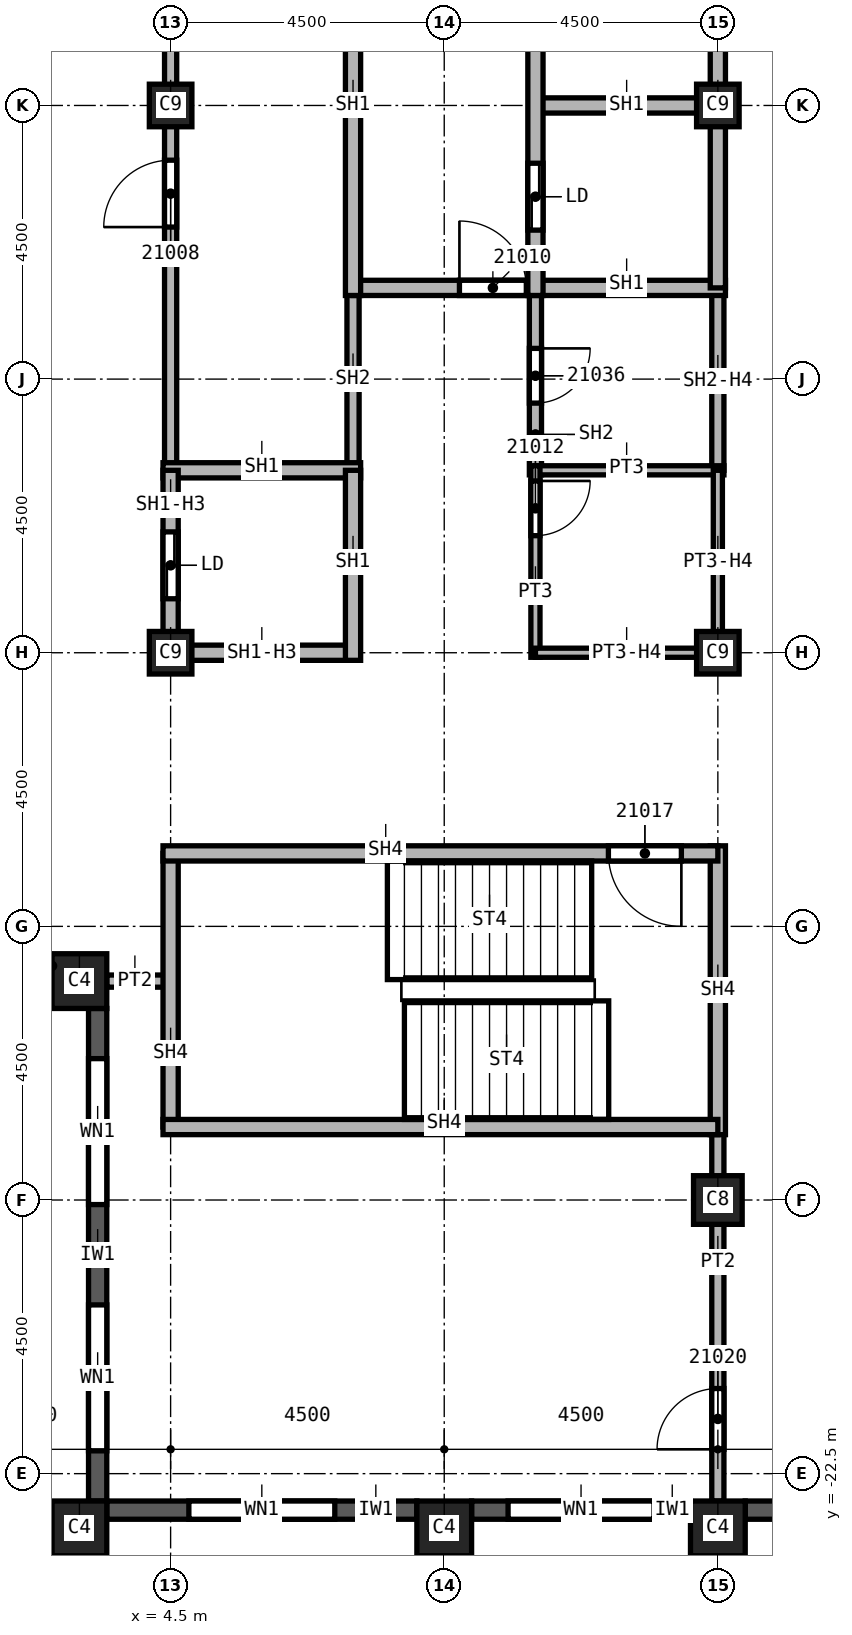
"""IFC4 building model, lengths in metres.
Left out: names, types, materials, properties, quantities, classifications, styles, units other than length and angle.
Written with IfcOpenShell. Run it as: python <this file> out.ifc"""

import sys

from ifc_helpers import new_model, si_unit, direction, frame, frame_2d, origin, origin_2d, place, context, subcontext, project, spatial, rectangle, extrude, element, fill, save


model = new_model("IFC4")
c1 = context("Model", 3, precision=1e-05, world=origin(), true_north=direction((0.0, 1.0)))
c2 = subcontext(c1, "Body", "Model", "MODEL_VIEW")
j1 = project(units=[si_unit("LENGTHUNIT", "METRE"), si_unit("PLANEANGLEUNIT", "RADIAN")], contexts=[c1])
p1 = place(None, origin())
s1 = spatial("IfcSite", under=j1, at=p1, CompositionType="ELEMENT")
p2 = place(p1, origin())
s2 = spatial("IfcBuilding", under=s1, at=p2, CompositionType="ELEMENT")
p3 = place(p2, frame((0.0, 0.0, 304.0)))
s3 = spatial("IfcBuildingStorey", under=s2, at=p3, CompositionType="ELEMENT", Elevation=304.0)
p4 = place(p3, frame((13.5, -18.0, 0.0), z_axis=(0.0, 0.0, 1.0), x_axis=(1.0, 0.0, 0.0)))
e1 = element("IfcColumn", 1, at=p4, inside=s3, PredefinedType="COLUMN", context=c2, shape_type="SweptSolid", body=[
    extrude(rectangle(XDim=0.8, YDim=0.8, at=origin_2d()), origin(), (0.0, 0.0, 1.0), 3.74),
])
for number, where, z_axis, x_axis in (
    (2, (4.5, 0.0, 0.0), (0.0, 0.0, 1.0), (1.0, 0.0, 0.0)),
    (3, (4.5, -9.0, 0.0), (0.0, 0.0, 1.0), (1.0, 0.0, 0.0)),
    (4, (13.5, 0.0, 0.0), (0.0, 0.0, 1.0), (1.0, 0.0, 0.0)),
    (5, (13.5, -9.0, 0.0), (0.0, 0.0, 1.0), (1.0, 0.0, 0.0)),
):
    element("IfcColumn", number, at=place(p3, frame(where, z_axis=z_axis, x_axis=x_axis)), inside=s3, PredefinedType="COLUMN", context=c2, shape_type="SweptSolid", body=[
        extrude(rectangle(XDim=0.7, YDim=0.7, at=origin_2d()), origin(), (0.0, 0.0, 1.0), 3.74),
    ])
for number, where, z_axis, x_axis in (
    (6, (3.0, -23.4, 0.0), (0.0, 0.0, 1.0), (1.0, 0.0, 0.0)),
    (7, (9.0, -23.4, 0.0), (0.0, 0.0, 1.0), (1.0, 0.0, 0.0)),
    (8, (13.5, -23.4, 0.0), (0.0, 0.0, 1.0), (1.0, 0.0, 0.0)),
    (9, (3.0, -14.4, 0.0), (0.0, 0.0, 1.0), (1.0, 0.0, 0.0)),
):
    element("IfcColumn", number, at=place(p3, frame(where, z_axis=z_axis, x_axis=x_axis)), inside=s3, PredefinedType="COLUMN", context=c2, shape_type="SweptSolid", body=[
        extrude(rectangle(XDim=0.9, YDim=0.9, at=origin_2d()), origin(), (0.0, 0.0, 1.0), 3.74),
    ])
p5 = place(p3, frame((3.3, -14.85, 0.0), z_axis=(0.0, 0.0, 1.0), x_axis=(0.0, -1.0, 0.0)))
e10 = element("IfcWall", 10, at=p5, inside=s3, PredefinedType="SOLIDWALL", context=c2, shape_type="SweptSolid", body=[
    extrude(rectangle(XDim=8.1, YDim=0.3, at=frame_2d((4.05, 0.0))), origin(), (0.0, 0.0, 1.0), 3.14),
])
p6 = place(p5, frame((0.825, 0.0, 0.8)))
e11 = element("IfcOpeningElement", 11, at=p6, cuts=e10, PredefinedType="OPENING", context=c2, shape_type="SweptSolid", body=[
    extrude(rectangle(XDim=2.4, YDim=1.95, at=frame_2d((1.2, 0.975))), frame((0.0, 0.15, 0.0), z_axis=(0.0, -1.0, 0.0), x_axis=(1.0, 0.0, 0.0)), (0.0, 0.0, 1.0), 0.3),
])
p7 = place(p5, frame((4.875, 0.0, 0.8)))
e12 = element("IfcOpeningElement", 12, at=p7, cuts=e10, PredefinedType="OPENING", context=c2, shape_type="SweptSolid", body=[
    extrude(rectangle(XDim=2.4, YDim=1.95, at=frame_2d((1.2, 0.975))), frame((0.0, 0.15, 0.0), z_axis=(0.0, -1.0, 0.0), x_axis=(1.0, 0.0, 0.0)), (0.0, 0.0, 1.0), 0.3),
])
p8 = place(p3, frame((3.45, -23.1, 0.0), z_axis=(0.0, 0.0, 1.0), x_axis=(1.0, 0.0, 0.0)))
e13 = element("IfcWall", 13, at=p8, inside=s3, PredefinedType="SOLIDWALL", context=c2, shape_type="SweptSolid", body=[
    extrude(rectangle(XDim=5.1, YDim=0.3, at=frame_2d((2.55, 0.0))), origin(), (0.0, 0.0, 1.0), 3.14),
])
p9 = place(p8, frame((1.35, 0.0, 0.8)))
e14 = element("IfcOpeningElement", 14, at=p9, cuts=e13, PredefinedType="OPENING", context=c2, shape_type="SweptSolid", body=[
    extrude(rectangle(XDim=2.4, YDim=1.95, at=frame_2d((1.2, 0.975))), frame((0.0, 0.15, 0.0), z_axis=(0.0, -1.0, 0.0), x_axis=(1.0, 0.0, 0.0)), (0.0, 0.0, 1.0), 0.3),
])
p10 = place(p3, frame((9.45, -23.1, 0.0), z_axis=(0.0, 0.0, 1.0), x_axis=(1.0, 0.0, 0.0)))
e15 = element("IfcWall", 15, at=p10, inside=s3, PredefinedType="SOLIDWALL", context=c2, shape_type="SweptSolid", body=[
    extrude(rectangle(XDim=3.6, YDim=0.3, at=frame_2d((1.8, 0.0))), origin(), (0.0, 0.0, 1.0), 3.14),
])
p11 = place(p10, frame((0.6, 0.0, 0.8)))
e16 = element("IfcOpeningElement", 16, at=p11, cuts=e15, PredefinedType="OPENING", context=c2, shape_type="SweptSolid", body=[
    extrude(rectangle(XDim=2.4, YDim=1.95, at=frame_2d((1.2, 0.975))), frame((0.0, 0.15, 0.0), z_axis=(0.0, -1.0, 0.0), x_axis=(1.0, 0.0, 0.0)), (0.0, 0.0, 1.0), 0.3),
])
p12 = place(p3, frame((13.95, -23.1, 0.0), z_axis=(0.0, 0.0, 1.0), x_axis=(1.0, 0.0, 0.0)))
e17 = element("IfcWall", 17, at=p12, inside=s3, PredefinedType="SOLIDWALL", context=c2, shape_type="SweptSolid", body=[
    extrude(rectangle(XDim=3.6, YDim=0.3, at=frame_2d((1.8, 0.0))), origin(), (0.0, 0.0, 1.0), 3.14),
])
p13 = place(p12, frame((0.625, 0.0, 0.8)))
e18 = element("IfcOpeningElement", 18, at=p13, cuts=e17, PredefinedType="OPENING", context=c2, shape_type="SweptSolid", body=[
    extrude(rectangle(XDim=0.6, YDim=1.95, at=frame_2d((0.3, 0.975))), frame((0.0, 0.15, 0.0), z_axis=(0.0, -1.0, 0.0), x_axis=(1.0, 0.0, 0.0)), (0.0, 0.0, 1.0), 0.3),
])
p14 = place(p12, frame((1.825, 0.0, 0.8)))
e19 = element("IfcOpeningElement", 19, at=p14, cuts=e17, PredefinedType="OPENING", context=c2, shape_type="SweptSolid", body=[
    extrude(rectangle(XDim=1.0, YDim=1.95, at=frame_2d((0.5, 0.975))), frame((0.0, 0.15, 0.0), z_axis=(0.0, -1.0, 0.0), x_axis=(1.0, 0.0, 0.0)), (0.0, 0.0, 1.0), 0.3),
])
p15 = place(p3, frame((4.5, -14.4, 0.0), z_axis=(0.0, 0.0, 1.0), x_axis=(-1.0, 0.0, 0.0)))
e20 = element("IfcWall", 20, at=p15, inside=s3, PredefinedType="PARTITIONING", context=c2, shape_type="SweptSolid", body=[
    extrude(rectangle(XDim=1.05, YDim=0.2, at=frame_2d((0.525, 0.0))), origin(), (0.0, 0.0, 1.0), 3.74),
])
p16 = place(p3, frame((13.5, -22.95, 0.0), z_axis=(0.0, 0.0, 1.0), x_axis=(0.0, 1.0, 0.0)))
e21 = element("IfcWall", 21, at=p16, inside=s3, PredefinedType="PARTITIONING", context=c2, shape_type="SweptSolid", body=[
    extrude(rectangle(XDim=6.275, YDim=0.2, at=frame_2d((3.137, 0.0))), origin(), (0.0, 0.0, 1.0), 3.74),
])
p17 = place(p16, frame((0.85, 0.0, 0.0)))
e22 = element("IfcOpeningElement", 22, at=p17, cuts=e21, PredefinedType="OPENING", context=c2, shape_type="SweptSolid", body=[
    extrude(rectangle(XDim=1.0, YDim=2.1, at=frame_2d((0.5, 1.05))), frame((0.0, 0.1, 0.0), z_axis=(0.0, -1.0, 0.0), x_axis=(1.0, 0.0, 0.0)), (0.0, 0.0, 1.0), 0.2),
])
p18 = place(p3, frame((4.5, -6.0, 0.0), z_axis=(0.0, 0.0, 1.0), x_axis=(0.0, 1.0, 0.0)))
e23 = element("IfcWall", 23, at=p18, inside=s3, PredefinedType="SOLIDWALL", context=c2, shape_type="SweptSolid", body=[
    extrude(rectangle(XDim=15.1, YDim=0.2, at=frame_2d((7.55, 0.0))), origin(), (0.0, 0.0, 1.0), 3.062),
])
p19 = place(p18, frame((4.0, 0.0, 0.0)))
e24 = element("IfcOpeningElement", 24, at=p19, cuts=e23, PredefinedType="OPENING", context=c2, shape_type="SweptSolid", body=[
    extrude(rectangle(XDim=1.1, YDim=2.1, at=frame_2d((0.55, 1.05))), frame((0.0, 0.1, 0.0), z_axis=(0.0, -1.0, 0.0), x_axis=(1.0, 0.0, 0.0)), (0.0, 0.0, 1.0), 0.2),
])
p20 = place(p18, frame((12.25, 0.0, 0.0)))
e25 = element("IfcOpeningElement", 25, at=p20, cuts=e23, PredefinedType="OPENING", context=c2, shape_type="SweptSolid", body=[
    extrude(rectangle(XDim=1.1, YDim=2.1, at=frame_2d((0.55, 1.05))), frame((0.0, 0.1, 0.0), z_axis=(0.0, -1.0, 0.0), x_axis=(1.0, 0.0, 0.0)), (0.0, 0.0, 1.0), 0.2),
])
p21 = place(p3, frame((7.5, -2.875, 0.0), z_axis=(0.0, 0.0, 1.0), x_axis=(0.0, -1.0, 0.0)))
e26 = element("IfcWall", 26, at=p21, inside=s3, PredefinedType="SOLIDWALL", context=c2, shape_type="SweptSolid", body=[
    extrude(rectangle(XDim=3.125, YDim=0.2, at=frame_2d((1.562, 0.0))), origin(), (0.0, 0.0, 1.0), 3.74),
])
p22 = place(p3, frame((10.5, -2.875, 0.0), z_axis=(0.0, 0.0, 1.0), x_axis=(0.0, -1.0, 0.0)))
e27 = element("IfcWall", 27, at=p22, inside=s3, PredefinedType="SOLIDWALL", context=c2, shape_type="SweptSolid", body=[
    extrude(rectangle(XDim=3.2, YDim=0.2, at=frame_2d((1.6, 0.0))), origin(), (0.0, 0.0, 1.0), 3.74),
])
p23 = place(p22, frame((1.12, 0.0, 0.0)))
e28 = element("IfcOpeningElement", 28, at=p23, cuts=e27, PredefinedType="OPENING", context=c2, shape_type="SweptSolid", body=[
    extrude(rectangle(XDim=0.9, YDim=2.1, at=frame_2d((0.45, 1.05))), frame((0.0, 0.1, 0.0), z_axis=(0.0, -1.0, 0.0), x_axis=(1.0, 0.0, 0.0)), (0.0, 0.0, 1.0), 0.2),
])
p24 = place(p3, frame((13.5, -3.0, 0.0), z_axis=(0.0, 0.0, 1.0), x_axis=(0.0, -1.0, 0.0)))
e29 = element("IfcWall", 29, at=p24, inside=s3, PredefinedType="SOLIDWALL", context=c2, shape_type="SweptSolid", body=[
    extrude(rectangle(XDim=3.0, YDim=0.2, at=frame_2d((1.5, 0.0))), origin(), (0.0, 0.0, 1.0), 3.062),
])
p25 = place(p3, frame((4.375, -6.0, 0.0), z_axis=(0.0, 0.0, 1.0), x_axis=(1.0, 0.0, 0.0)))
e30 = element("IfcWall", 30, at=p25, inside=s3, PredefinedType="SOLIDWALL", context=c2, shape_type="SweptSolid", body=[
    extrude(rectangle(XDim=3.25, YDim=0.25, at=frame_2d((1.625, 0.0))), origin(), (0.0, 0.0, 1.0), 3.74),
])
p26 = place(p3, frame((4.5, -9.125, 0.0), z_axis=(0.0, 0.0, 1.0), x_axis=(0.0, 1.0, 0.0)))
e31 = element("IfcWall", 31, at=p26, inside=s3, PredefinedType="SOLIDWALL", context=c2, shape_type="SweptSolid", body=[
    extrude(rectangle(XDim=3.125, YDim=0.25, at=frame_2d((1.562, 0.0))), origin(), (0.0, 0.0, 1.0), 3.062),
])
p27 = place(p26, frame((1.012, 0.0, 0.0)))
e32 = element("IfcOpeningElement", 32, at=p27, cuts=e31, PredefinedType="OPENING", context=c2, shape_type="SweptSolid", body=[
    extrude(rectangle(XDim=1.1, YDim=2.1, at=frame_2d((0.55, 1.05))), frame((0.0, 0.125, 0.0), z_axis=(0.0, -1.0, 0.0), x_axis=(1.0, 0.0, 0.0)), (0.0, 0.0, 1.0), 0.25),
])
p28 = place(p3, frame((7.5, -9.0, 0.0), z_axis=(0.0, 0.0, 1.0), x_axis=(-1.0, 0.0, 0.0)))
e33 = element("IfcWall", 33, at=p28, inside=s3, PredefinedType="SOLIDWALL", context=c2, shape_type="SweptSolid", body=[
    extrude(rectangle(XDim=3.0, YDim=0.25, at=frame_2d((1.5, 0.0))), origin(), (0.0, 0.0, 1.0), 3.062),
])
p29 = place(p3, frame((7.5, -6.0, 0.0), z_axis=(0.0, 0.0, 1.0), x_axis=(0.0, -1.0, 0.0)))
e34 = element("IfcWall", 34, at=p29, inside=s3, PredefinedType="SOLIDWALL", context=c2, shape_type="SweptSolid", body=[
    extrude(rectangle(XDim=3.125, YDim=0.25, at=frame_2d((1.562, 0.0))), origin(), (0.0, 0.0, 1.0), 3.74),
])
p30 = place(p3, frame((7.5, -3.0, 0.0), z_axis=(0.0, 0.0, 1.0), x_axis=(1.0, 0.0, 0.0)))
e35 = element("IfcWall", 35, at=p30, inside=s3, PredefinedType="SOLIDWALL", context=c2, shape_type="SweptSolid", body=[
    extrude(rectangle(XDim=6.125, YDim=0.25, at=frame_2d((3.062, 0.0))), origin(), (0.0, 0.0, 1.0), 3.74),
])
p31 = place(p30, frame((1.75, 0.0, 0.0)))
e36 = element("IfcOpeningElement", 36, at=p31, cuts=e35, PredefinedType="OPENING", context=c2, shape_type="SweptSolid", body=[
    extrude(rectangle(XDim=1.1, YDim=2.1, at=frame_2d((0.55, 1.05))), frame((0.0, 0.125, 0.0), z_axis=(0.0, -1.0, 0.0), x_axis=(1.0, 0.0, 0.0)), (0.0, 0.0, 1.0), 0.25),
])
p32 = place(p3, frame((7.5, 3.125, 0.0), z_axis=(0.0, 0.0, 1.0), x_axis=(0.0, -1.0, 0.0)))
e37 = element("IfcWall", 37, at=p32, inside=s3, PredefinedType="SOLIDWALL", context=c2, shape_type="SweptSolid", body=[
    extrude(rectangle(XDim=6.25, YDim=0.25, at=frame_2d((3.125, 0.0))), origin(), (0.0, 0.0, 1.0), 3.74),
])
p33 = place(p3, frame((10.5, 0.0, 0.0), z_axis=(0.0, 0.0, 1.0), x_axis=(1.0, 0.0, 0.0)))
e38 = element("IfcWall", 38, at=p33, inside=s3, PredefinedType="SOLIDWALL", context=c2, shape_type="SweptSolid", body=[
    extrude(rectangle(XDim=3.125, YDim=0.25, at=frame_2d((1.562, 0.0))), origin(), (0.0, 0.0, 1.0), 3.74),
])
p34 = place(p3, frame((10.5, 6.125, 0.0), z_axis=(0.0, 0.0, 1.0), x_axis=(0.0, -1.0, 0.0)))
e39 = element("IfcWall", 39, at=p34, inside=s3, PredefinedType="SOLIDWALL", context=c2, shape_type="SweptSolid", body=[
    extrude(rectangle(XDim=9.25, YDim=0.25, at=frame_2d((4.625, 0.0))), origin(), (0.0, 0.0, 1.0), 3.74),
])
p35 = place(p34, frame((7.075, 0.0, 0.0)))
e40 = element("IfcOpeningElement", 40, at=p35, cuts=e39, PredefinedType="OPENING", context=c2, shape_type="SweptSolid", body=[
    extrude(rectangle(XDim=1.1, YDim=2.1, at=frame_2d((0.55, 1.05))), frame((0.0, 0.125, 0.0), z_axis=(0.0, -1.0, 0.0), x_axis=(1.0, 0.0, 0.0)), (0.0, 0.0, 1.0), 0.25),
])
p36 = place(p34, frame((4.075, 0.0, 0.0)))
e41 = element("IfcOpeningElement", 41, at=p36, cuts=e39, PredefinedType="OPENING", context=c2, shape_type="SweptSolid", body=[
    extrude(rectangle(XDim=1.1, YDim=2.1, at=frame_2d((0.55, 1.05))), frame((0.0, 0.125, 0.0), z_axis=(0.0, -1.0, 0.0), x_axis=(1.0, 0.0, 0.0)), (0.0, 0.0, 1.0), 0.25),
])
p37 = place(p3, frame((13.5, 6.0, 0.0), z_axis=(0.0, 0.0, 1.0), x_axis=(0.0, -1.0, 0.0)))
e42 = element("IfcWall", 42, at=p37, inside=s3, PredefinedType="SOLIDWALL", context=c2, shape_type="SweptSolid", body=[
    extrude(rectangle(XDim=9.0, YDim=0.25, at=frame_2d((4.5, 0.0))), origin(), (0.0, 0.0, 1.0), 3.062),
])
p38 = place(p3, frame((4.5, -16.8, 0.0), z_axis=(0.0, 0.0, 1.0), x_axis=(0.0, 1.0, 0.0)))
e43 = element("IfcWall", 43, at=p38, inside=s3, PredefinedType="SOLIDWALL", context=c2, shape_type="SweptSolid", body=[
    extrude(rectangle(XDim=4.5, YDim=0.25, at=frame_2d((2.25, 0.0))), origin(), (0.0, 0.0, 1.0), 3.74),
])
p39 = place(p3, frame((13.5, -16.925, 0.0), z_axis=(0.0, 0.0, 1.0), x_axis=(0.0, 1.0, 0.0)))
e44 = element("IfcWall", 44, at=p39, inside=s3, PredefinedType="SOLIDWALL", context=c2, shape_type="SweptSolid", body=[
    extrude(rectangle(XDim=4.75, YDim=0.25, at=frame_2d((2.375, 0.0))), origin(), (0.0, 0.0, 1.0), 3.74),
])
p40 = place(p3, frame((13.5, -16.8, 0.0), z_axis=(0.0, 0.0, 1.0), x_axis=(-1.0, 0.0, 0.0)))
e45 = element("IfcWall", 45, at=p40, inside=s3, PredefinedType="SOLIDWALL", context=c2, shape_type="SweptSolid", body=[
    extrude(rectangle(XDim=9.125, YDim=0.25, at=frame_2d((4.562, 0.0))), origin(), (0.0, 0.0, 1.0), 3.74),
])
p41 = place(p3, frame((13.5, -12.3, 0.0), z_axis=(0.0, 0.0, 1.0), x_axis=(-1.0, 0.0, 0.0)))
e46 = element("IfcWall", 46, at=p41, inside=s3, PredefinedType="SOLIDWALL", context=c2, shape_type="SweptSolid", body=[
    extrude(rectangle(XDim=9.125, YDim=0.25, at=frame_2d((4.562, 0.0))), origin(), (0.0, 0.0, 1.0), 3.74),
])
p42 = place(p41, frame((0.6, 0.0, 0.0)))
e47 = element("IfcOpeningElement", 47, at=p42, cuts=e46, PredefinedType="OPENING", context=c2, shape_type="SweptSolid", body=[
    extrude(rectangle(XDim=1.2, YDim=2.1, at=frame_2d((0.6, 1.05))), frame((0.0, 0.125, 0.0), z_axis=(0.0, -1.0, 0.0), x_axis=(1.0, 0.0, 0.0)), (0.0, 0.0, 1.0), 0.25),
])
p43 = place(p3, frame((10.5, -6.0, 0.0), z_axis=(0.0, 0.0, 1.0), x_axis=(1.0, 0.0, 0.0)))
e48 = element("IfcWall", 48, at=p43, inside=s3, PredefinedType="PARTITIONING", context=c2, shape_type="SweptSolid", body=[
    extrude(rectangle(XDim=3.1, YDim=0.15, at=frame_2d((1.55, 0.0))), origin(), (0.0, 0.0, 1.0), 3.74),
])
p44 = place(p3, frame((10.5, -5.925, 0.0), z_axis=(0.0, 0.0, 1.0), x_axis=(0.0, -1.0, 0.0)))
e49 = element("IfcWall", 49, at=p44, inside=s3, PredefinedType="PARTITIONING", context=c2, shape_type="SweptSolid", body=[
    extrude(rectangle(XDim=3.15, YDim=0.15, at=frame_2d((1.575, 0.0))), origin(), (0.0, 0.0, 1.0), 3.74),
])
p45 = place(p44, frame((0.25, 0.0, 0.0)))
e50 = element("IfcOpeningElement", 50, at=p45, cuts=e49, PredefinedType="OPENING", context=c2, shape_type="SweptSolid", body=[
    extrude(rectangle(XDim=0.9, YDim=2.1, at=frame_2d((0.45, 1.05))), frame((0.0, 0.075, 0.0), z_axis=(0.0, -1.0, 0.0), x_axis=(1.0, 0.0, 0.0)), (0.0, 0.0, 1.0), 0.15),
])
p46 = place(p3, frame((13.5, -9.0, 0.0), z_axis=(0.0, 0.0, 1.0), x_axis=(-1.0, 0.0, 0.0)))
e51 = element("IfcWall", 51, at=p46, inside=s3, PredefinedType="PARTITIONING", context=c2, shape_type="SweptSolid", body=[
    extrude(rectangle(XDim=3.0, YDim=0.15, at=frame_2d((1.5, 0.0))), origin(), (0.0, 0.0, 1.0), 3.062),
])
p47 = place(p3, frame((13.5, -6.0, 0.0), z_axis=(0.0, 0.0, 1.0), x_axis=(0.0, -1.0, 0.0)))
e52 = element("IfcWall", 52, at=p47, inside=s3, PredefinedType="PARTITIONING", context=c2, shape_type="SweptSolid", body=[
    extrude(rectangle(XDim=3.075, YDim=0.15, at=frame_2d((1.538, 0.0))), origin(), (0.0, 0.0, 1.0), 3.062),
])
p48 = place(p6, origin())
e53 = element("IfcWindow", 53, at=p48, inside=s3, PartitioningType="SINGLE_PANEL", PredefinedType="WINDOW", context=c2, shape_type="SweptSolid", body=[
    extrude(rectangle(XDim=2.4, YDim=1.95, at=frame_2d((1.2, 0.975))), frame((0.0, 0.03, 0.0), z_axis=(0.0, -1.0, 0.0), x_axis=(1.0, 0.0, 0.0)), (0.0, 0.0, 1.0), 0.06),
])
fill(e11, e53)
p49 = place(p7, origin())
e54 = element("IfcWindow", 54, at=p49, inside=s3, PartitioningType="SINGLE_PANEL", PredefinedType="WINDOW", context=c2, shape_type="SweptSolid", body=[
    extrude(rectangle(XDim=2.4, YDim=1.95, at=frame_2d((1.2, 0.975))), frame((0.0, 0.03, 0.0), z_axis=(0.0, -1.0, 0.0), x_axis=(1.0, 0.0, 0.0)), (0.0, 0.0, 1.0), 0.06),
])
fill(e12, e54)
p50 = place(p9, origin())
e55 = element("IfcWindow", 55, at=p50, inside=s3, PartitioningType="SINGLE_PANEL", PredefinedType="WINDOW", context=c2, shape_type="SweptSolid", body=[
    extrude(rectangle(XDim=2.4, YDim=1.95, at=frame_2d((1.2, 0.975))), frame((0.0, 0.03, 0.0), z_axis=(0.0, -1.0, 0.0), x_axis=(1.0, 0.0, 0.0)), (0.0, 0.0, 1.0), 0.06),
])
fill(e14, e55)
p51 = place(p11, origin())
e56 = element("IfcWindow", 56, at=p51, inside=s3, PartitioningType="SINGLE_PANEL", PredefinedType="WINDOW", context=c2, shape_type="SweptSolid", body=[
    extrude(rectangle(XDim=2.4, YDim=1.95, at=frame_2d((1.2, 0.975))), frame((0.0, 0.03, 0.0), z_axis=(0.0, -1.0, 0.0), x_axis=(1.0, 0.0, 0.0)), (0.0, 0.0, 1.0), 0.06),
])
fill(e16, e56)
p52 = place(p19, origin())
e57 = element("IfcDoor", 57, at=p52, inside=s3, OperationType="SINGLE_SWING_LEFT", PredefinedType="DOOR", context=c2, shape_type="SweptSolid", body=[
    extrude(rectangle(XDim=1.1, YDim=2.1, at=frame_2d((0.55, 1.05))), frame((0.0, 0.025, 0.0), z_axis=(0.0, -1.0, 0.0), x_axis=(1.0, 0.0, 0.0)), (0.0, 0.0, 1.0), 0.05),
])
fill(e24, e57)
p53 = place(p31, origin())
e58 = element("IfcDoor", 58, at=p53, inside=s3, OperationType="SINGLE_SWING_LEFT", PredefinedType="DOOR", context=c2, shape_type="SweptSolid", body=[
    extrude(rectangle(XDim=1.1, YDim=2.1, at=frame_2d((0.55, 1.05))), frame((0.0, 0.025, 0.0), z_axis=(0.0, -1.0, 0.0), x_axis=(1.0, 0.0, 0.0)), (0.0, 0.0, 1.0), 0.05),
])
fill(e36, e58)
p54 = place(p45, origin())
e59 = element("IfcDoor", 59, at=p54, inside=s3, OperationType="SINGLE_SWING_LEFT", PredefinedType="DOOR", context=c2, shape_type="SweptSolid", body=[
    extrude(rectangle(XDim=0.9, YDim=2.1, at=frame_2d((0.45, 1.05))), frame((0.0, 0.025, 0.0), z_axis=(0.0, -1.0, 0.0), x_axis=(1.0, 0.0, 0.0)), (0.0, 0.0, 1.0), 0.05),
])
fill(e50, e59)
p55 = place(p42, origin())
e60 = element("IfcDoor", 60, at=p55, inside=s3, OperationType="SINGLE_SWING_RIGHT", PredefinedType="DOOR", context=c2, shape_type="SweptSolid", body=[
    extrude(rectangle(XDim=1.2, YDim=2.1, at=frame_2d((0.6, 1.05))), frame((0.0, 0.025, 0.0), z_axis=(0.0, -1.0, 0.0), x_axis=(1.0, 0.0, 0.0)), (0.0, 0.0, 1.0), 0.05),
])
fill(e47, e60)
p56 = place(p17, origin())
e61 = element("IfcDoor", 61, at=p56, inside=s3, OperationType="SINGLE_SWING_LEFT", PredefinedType="DOOR", context=c2, shape_type="SweptSolid", body=[
    extrude(rectangle(XDim=1.0, YDim=2.1, at=frame_2d((0.5, 1.05))), frame((0.0, 0.025, 0.0), z_axis=(0.0, -1.0, 0.0), x_axis=(1.0, 0.0, 0.0)), (0.0, 0.0, 1.0), 0.05),
])
fill(e22, e61)
p57 = place(p23, origin())
e62 = element("IfcDoor", 62, at=p57, inside=s3, OperationType="SINGLE_SWING_LEFT", PredefinedType="DOOR", context=c2, shape_type="SweptSolid", body=[
    extrude(rectangle(XDim=0.9, YDim=2.1, at=frame_2d((0.45, 1.05))), frame((0.0, 0.025, 0.0), z_axis=(0.0, -1.0, 0.0), x_axis=(1.0, 0.0, 0.0)), (0.0, 0.0, 1.0), 0.05),
])
fill(e28, e62)
p58 = place(p27, origin())
e63 = element("IfcDoor", 63, at=p58, inside=s3, OperationType="SLIDING_TO_LEFT", PredefinedType="DOOR", context=c2, shape_type="SweptSolid", body=[
    extrude(rectangle(XDim=1.1, YDim=2.1, at=frame_2d((0.55, 1.05))), frame((0.0, 0.025, 0.0), z_axis=(0.0, -1.0, 0.0), x_axis=(1.0, 0.0, 0.0)), (0.0, 0.0, 1.0), 0.05),
])
fill(e32, e63)
p59 = place(p35, origin())
e64 = element("IfcDoor", 64, at=p59, inside=s3, OperationType="SLIDING_TO_LEFT", PredefinedType="DOOR", context=c2, shape_type="SweptSolid", body=[
    extrude(rectangle(XDim=1.1, YDim=2.1, at=frame_2d((0.55, 1.05))), frame((0.0, 0.025, 0.0), z_axis=(0.0, -1.0, 0.0), x_axis=(1.0, 0.0, 0.0)), (0.0, 0.0, 1.0), 0.05),
])
fill(e40, e64)
save(model, sys.argv[1])
